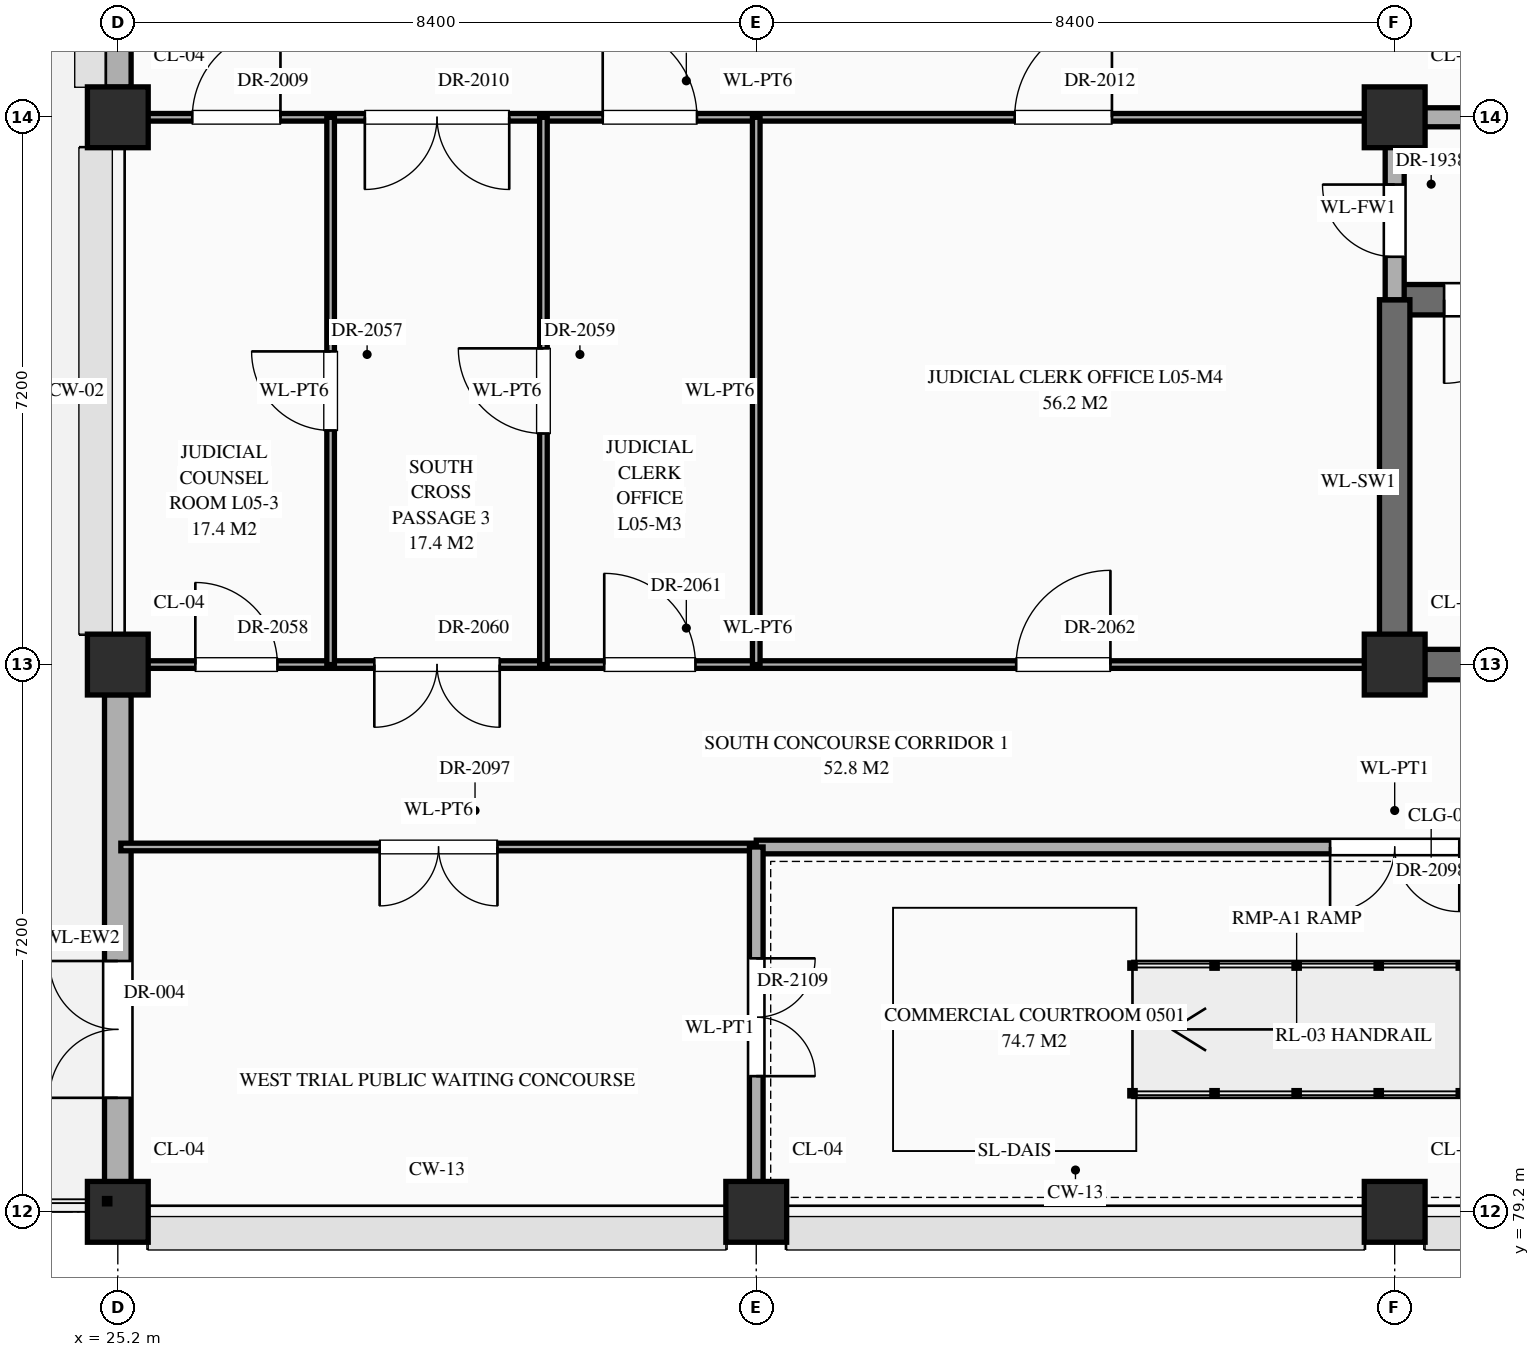
"""IFC4 building model, lengths in metres.
Left out: names, types, materials, properties, quantities, classifications, styles, units other than length and angle.
Written with IfcOpenShell. Run it as: python <this file> out.ifc"""

import sys

from ifc_helpers import new_model, si_unit, direction, frame, frame_2d, origin, origin_2d, place, context, subcontext, project, spatial, rectangle, extrude, element, fill, save


model = new_model("IFC4")
c1 = context("Model", 3, precision=1e-05, world=origin(), true_north=direction((0.0, 1.0)))
c2 = subcontext(c1, "Body", "Model", "MODEL_VIEW")
j1 = project(units=[si_unit("LENGTHUNIT", "METRE"), si_unit("PLANEANGLEUNIT", "RADIAN")], contexts=[c1])
p1 = place(None, origin())
s1 = spatial("IfcSite", under=j1, at=p1, CompositionType="ELEMENT")
p2 = place(p1, origin())
s2 = spatial("IfcBuilding", under=s1, at=p2, CompositionType="ELEMENT")
p3 = place(p2, frame((0.0, 0.0, 21.6)))
s3 = spatial("IfcBuildingStorey", under=s2, at=p3, CompositionType="ELEMENT", Elevation=21.6)
for number, where, z_axis, x_axis in (
    (1, (25.2, 79.2, 0.0), (0.0, 0.0, 1.0), (1.0, 0.0, 0.0)),
    (2, (25.2, 86.4, 0.0), (0.0, 0.0, 1.0), (1.0, 0.0, 0.0)),
    (3, (25.2, 93.6, 0.0), (0.0, 0.0, 1.0), (1.0, 0.0, 0.0)),
    (4, (33.6, 79.2, 0.0), (0.0, 0.0, 1.0), (1.0, 0.0, 0.0)),
    (5, (42.0, 79.2, 0.0), (0.0, 0.0, 1.0), (1.0, 0.0, 0.0)),
    (6, (42.0, 86.4, 0.0), (0.0, 0.0, 1.0), (1.0, 0.0, 0.0)),
    (7, (42.0, 93.6, 0.0), (0.0, 0.0, 1.0), (1.0, 0.0, 0.0)),
):
    element("IfcColumn", number, at=place(p3, frame(where, z_axis=z_axis, x_axis=x_axis)), inside=s3, PredefinedType="COLUMN", context=c2, shape_type="SweptSolid", body=[
        extrude(rectangle(XDim=0.8, YDim=0.8, at=origin_2d()), origin(), (0.0, 0.0, 1.0), 4.5),
    ])
p4 = place(p3, frame((25.2, 79.595, 0.0), z_axis=(0.0, 0.0, 1.0), x_axis=(0.0, 1.0, 0.0)))
e8 = element("IfcWall", 8, at=p4, inside=s3, PredefinedType="STANDARD", context=c2, shape_type="SweptSolid", body=[
    extrude(rectangle(XDim=6.41, YDim=0.35, at=frame_2d((3.205, 0.0))), origin(), (0.0, 0.0, 1.0), 3.59),
])
p5 = place(p4, frame((1.105, 0.0, 0.0)))
e9 = element("IfcOpeningElement", 9, at=p5, cuts=e8, PredefinedType="OPENING", context=c2, shape_type="SweptSolid", body=[
    extrude(rectangle(XDim=1.8, YDim=2.25, at=frame_2d((0.9, 1.125))), frame((0.0, 0.187, 0.0), z_axis=(0.0, -1.0, 0.0), x_axis=(1.0, 0.0, 0.0)), (0.0, 0.0, 1.0), 0.374),
])
p6 = place(p3, frame((25.2, 93.995, 0.0), z_axis=(0.0, 0.0, 1.0), x_axis=(0.0, 1.0, 0.0)))
e10 = element("IfcWall", 10, at=p6, inside=s3, PredefinedType="STANDARD", context=c2, shape_type="SweptSolid", body=[
    extrude(rectangle(XDim=6.41, YDim=0.35, at=frame_2d((3.205, 0.0))), origin(), (0.0, 0.0, 1.0), 3.59),
])
p7 = place(p6, frame((3.905, 0.0, 0.85)))
e11 = element("IfcOpeningElement", 11, at=p7, cuts=e10, PredefinedType="OPENING", context=c2, shape_type="SweptSolid", body=[
    extrude(rectangle(XDim=1.2, YDim=1.74, at=frame_2d((0.6, 0.87))), frame((0.0, 0.187, 0.0), z_axis=(0.0, -1.0, 0.0), x_axis=(1.0, 0.0, 0.0)), (0.0, 0.0, 1.0), 0.374),
])
p8 = place(p3, frame((25.24, 84.0, 0.0), z_axis=(0.0, 0.0, 1.0), x_axis=(1.0, 0.0, 0.0)))
e12 = element("IfcWall", 12, at=p8, inside=s3, PredefinedType="STANDARD", context=c2, shape_type="SweptSolid", body=[
    extrude(rectangle(XDim=8.36, YDim=0.1, at=frame_2d((4.18, 0.0))), origin(), (0.0, 0.0, 1.0), 4.24),
])
p9 = place(p8, frame((3.405, 0.0, 0.0)))
e13 = element("IfcOpeningElement", 13, at=p9, cuts=e12, PredefinedType="OPENING", context=c2, shape_type="SweptSolid", body=[
    extrude(rectangle(XDim=1.55, YDim=2.35, at=frame_2d((0.775, 1.175))), frame((0.0, 0.062, 0.0), z_axis=(0.0, -1.0, 0.0), x_axis=(1.0, 0.0, 0.0)), (0.0, 0.0, 1.0), 0.124),
])
p10 = place(p3, frame((33.6, 84.0, 0.0), z_axis=(0.0, 0.0, 1.0), x_axis=(1.0, 0.0, 0.0)))
e14 = element("IfcWall", 14, at=p10, inside=s3, PredefinedType="STANDARD", context=c2, shape_type="SweptSolid", body=[
    extrude(rectangle(XDim=16.8, YDim=0.18, at=frame_2d((8.4, 0.0))), origin(), (0.0, 0.0, 1.0), 4.24),
])
p11 = place(p10, frame((7.55, 0.0, 0.0)))
e15 = element("IfcOpeningElement", 15, at=p11, cuts=e14, PredefinedType="OPENING", context=c2, shape_type="SweptSolid", body=[
    extrude(rectangle(XDim=1.7, YDim=2.45, at=frame_2d((0.85, 1.225))), frame((0.0, 0.102, 0.0), z_axis=(0.0, -1.0, 0.0), x_axis=(1.0, 0.0, 0.0)), (0.0, 0.0, 1.0), 0.204),
])
p12 = place(p3, frame((25.24, 86.4, 0.0), z_axis=(0.0, 0.0, 1.0), x_axis=(1.0, 0.0, 0.0)))
e16 = element("IfcWall", 16, at=p12, inside=s3, PredefinedType="STANDARD", context=c2, shape_type="SweptSolid", body=[
    extrude(rectangle(XDim=16.76, YDim=0.1, at=frame_2d((8.38, 0.0))), origin(), (0.0, 0.0, 1.0), 3.19),
])
p13 = place(p12, frame((0.98, 0.0, 0.0)))
e17 = element("IfcOpeningElement", 17, at=p13, cuts=e16, PredefinedType="OPENING", context=c2, shape_type="SweptSolid", body=[
    extrude(rectangle(XDim=1.08, YDim=2.25, at=frame_2d((0.54, 1.125))), frame((0.0, 0.062, 0.0), z_axis=(0.0, -1.0, 0.0), x_axis=(1.0, 0.0, 0.0)), (0.0, 0.0, 1.0), 0.124),
])
p14 = place(p12, frame((3.335, 0.0, 0.0)))
e18 = element("IfcOpeningElement", 18, at=p14, cuts=e16, PredefinedType="OPENING", context=c2, shape_type="SweptSolid", body=[
    extrude(rectangle(XDim=1.65, YDim=2.4, at=frame_2d((0.825, 1.2))), frame((0.0, 0.062, 0.0), z_axis=(0.0, -1.0, 0.0), x_axis=(1.0, 0.0, 0.0)), (0.0, 0.0, 1.0), 0.124),
])
p15 = place(p12, frame((6.36, 0.0, 0.0)))
e19 = element("IfcOpeningElement", 19, at=p15, cuts=e16, PredefinedType="OPENING", context=c2, shape_type="SweptSolid", body=[
    extrude(rectangle(XDim=1.2, YDim=2.35, at=frame_2d((0.6, 1.175))), frame((0.0, 0.062, 0.0), z_axis=(0.0, -1.0, 0.0), x_axis=(1.0, 0.0, 0.0)), (0.0, 0.0, 1.0), 0.124),
])
p16 = place(p12, frame((11.78, 0.0, 0.0)))
e20 = element("IfcOpeningElement", 20, at=p16, cuts=e16, PredefinedType="OPENING", context=c2, shape_type="SweptSolid", body=[
    extrude(rectangle(XDim=1.24, YDim=2.3, at=frame_2d((0.62, 1.15))), frame((0.0, 0.062, 0.0), z_axis=(0.0, -1.0, 0.0), x_axis=(1.0, 0.0, 0.0)), (0.0, 0.0, 1.0), 0.124),
])
p17 = place(p3, frame((42.0, 86.4, 0.0), z_axis=(0.0, 0.0, 1.0), x_axis=(1.0, 0.0, 0.0)))
e21 = element("IfcWall", 21, at=p17, inside=s3, PredefinedType="SHEAR", context=c2, shape_type="SweptSolid", body=[
    extrude(rectangle(XDim=8.4, YDim=0.4, at=frame_2d((4.2, 0.0))), origin(), (0.0, 0.0, 1.0), 4.24),
])
p18 = place(p3, frame((42.0, 91.2, 0.0), z_axis=(0.0, 0.0, 1.0), x_axis=(1.0, 0.0, 0.0)))
e22 = element("IfcWall", 22, at=p18, inside=s3, PredefinedType="SHEAR", context=c2, shape_type="SweptSolid", body=[
    extrude(rectangle(XDim=8.4, YDim=0.4, at=frame_2d((4.2, 0.0))), origin(), (0.0, 0.0, 1.0), 4.24),
])
p19 = place(p18, frame((0.65, 0.0, 0.0)))
e23 = element("IfcOpeningElement", 23, at=p19, cuts=e22, PredefinedType="OPENING", context=c2, shape_type="SweptSolid", body=[
    extrude(rectangle(XDim=1.1, YDim=2.2, at=frame_2d((0.55, 1.1))), frame((0.0, 0.212, 0.0), z_axis=(0.0, -1.0, 0.0), x_axis=(1.0, 0.0, 0.0)), (0.0, 0.0, 1.0), 0.424),
])
p20 = place(p3, frame((25.24, 93.6, 0.0), z_axis=(0.0, 0.0, 1.0), x_axis=(1.0, 0.0, 0.0)))
e24 = element("IfcWall", 24, at=p20, inside=s3, PredefinedType="STANDARD", context=c2, shape_type="SweptSolid", body=[
    extrude(rectangle(XDim=16.76, YDim=0.1, at=frame_2d((8.38, 0.0))), origin(), (0.0, 0.0, 1.0), 3.19),
])
p21 = place(p20, frame((0.94, 0.0, 0.0)))
e25 = element("IfcOpeningElement", 25, at=p21, cuts=e24, PredefinedType="OPENING", context=c2, shape_type="SweptSolid", body=[
    extrude(rectangle(XDim=1.16, YDim=2.3, at=frame_2d((0.58, 1.15))), frame((0.0, 0.062, 0.0), z_axis=(0.0, -1.0, 0.0), x_axis=(1.0, 0.0, 0.0)), (0.0, 0.0, 1.0), 0.124),
])
p22 = place(p20, frame((3.21, 0.0, 0.0)))
e26 = element("IfcOpeningElement", 26, at=p22, cuts=e24, PredefinedType="OPENING", context=c2, shape_type="SweptSolid", body=[
    extrude(rectangle(XDim=1.9, YDim=2.5, at=frame_2d((0.95, 1.25))), frame((0.0, 0.062, 0.0), z_axis=(0.0, -1.0, 0.0), x_axis=(1.0, 0.0, 0.0)), (0.0, 0.0, 1.0), 0.124),
])
p23 = place(p20, frame((6.34, 0.0, 0.0)))
e27 = element("IfcOpeningElement", 27, at=p23, cuts=e24, PredefinedType="OPENING", context=c2, shape_type="SweptSolid", body=[
    extrude(rectangle(XDim=1.24, YDim=2.3, at=frame_2d((0.62, 1.15))), frame((0.0, 0.062, 0.0), z_axis=(0.0, -1.0, 0.0), x_axis=(1.0, 0.0, 0.0)), (0.0, 0.0, 1.0), 0.124),
])
p24 = place(p20, frame((11.76, 0.0, 0.0)))
e28 = element("IfcOpeningElement", 28, at=p24, cuts=e24, PredefinedType="OPENING", context=c2, shape_type="SweptSolid", body=[
    extrude(rectangle(XDim=1.28, YDim=2.35, at=frame_2d((0.64, 1.175))), frame((0.0, 0.062, 0.0), z_axis=(0.0, -1.0, 0.0), x_axis=(1.0, 0.0, 0.0)), (0.0, 0.0, 1.0), 0.124),
])
p25 = place(p3, frame((42.0, 93.6, 0.0), z_axis=(0.0, 0.0, 1.0), x_axis=(1.0, 0.0, 0.0)))
e29 = element("IfcWall", 29, at=p25, inside=s3, PredefinedType="STANDARD", context=c2, shape_type="SweptSolid", body=[
    extrude(rectangle(XDim=8.4, YDim=0.25, at=frame_2d((4.2, 0.0))), origin(), (0.0, 0.0, 1.0), 3.39),
])
p26 = place(p25, frame((3.45, 0.0, 0.0)))
e30 = element("IfcOpeningElement", 30, at=p26, cuts=e29, PredefinedType="OPENING", context=c2, shape_type="SweptSolid", body=[
    extrude(rectangle(XDim=1.5, YDim=2.25, at=frame_2d((0.75, 1.125))), frame((0.0, 0.137, 0.0), z_axis=(0.0, -1.0, 0.0), x_axis=(1.0, 0.0, 0.0)), (0.0, 0.0, 1.0), 0.274),
])
p27 = place(p3, frame((28.0, 86.4, 0.0), z_axis=(0.0, 0.0, 1.0), x_axis=(0.0, 1.0, 0.0)))
e31 = element("IfcWall", 31, at=p27, inside=s3, PredefinedType="STANDARD", context=c2, shape_type="SweptSolid", body=[
    extrude(rectangle(XDim=7.2, YDim=0.1, at=frame_2d((3.6, 0.0))), origin(), (0.0, 0.0, 1.0), 4.24),
])
p28 = place(p27, frame((3.08, 0.0, 0.0)))
e32 = element("IfcOpeningElement", 32, at=p28, cuts=e31, PredefinedType="OPENING", context=c2, shape_type="SweptSolid", body=[
    extrude(rectangle(XDim=1.04, YDim=2.2, at=frame_2d((0.52, 1.1))), frame((0.0, 0.062, 0.0), z_axis=(0.0, -1.0, 0.0), x_axis=(1.0, 0.0, 0.0)), (0.0, 0.0, 1.0), 0.124),
])
p29 = place(p3, frame((30.8, 86.4, 0.0), z_axis=(0.0, 0.0, 1.0), x_axis=(0.0, 1.0, 0.0)))
e33 = element("IfcWall", 33, at=p29, inside=s3, PredefinedType="STANDARD", context=c2, shape_type="SweptSolid", body=[
    extrude(rectangle(XDim=7.2, YDim=0.1, at=frame_2d((3.6, 0.0))), origin(), (0.0, 0.0, 1.0), 4.24),
])
p30 = place(p29, frame((3.04, 0.0, 0.0)))
e34 = element("IfcOpeningElement", 34, at=p30, cuts=e33, PredefinedType="OPENING", context=c2, shape_type="SweptSolid", body=[
    extrude(rectangle(XDim=1.12, YDim=2.25, at=frame_2d((0.56, 1.125))), frame((0.0, 0.062, 0.0), z_axis=(0.0, -1.0, 0.0), x_axis=(1.0, 0.0, 0.0)), (0.0, 0.0, 1.0), 0.124),
])
p31 = place(p3, frame((33.6, 79.24, 0.0), z_axis=(0.0, 0.0, 1.0), x_axis=(0.0, 1.0, 0.0)))
e35 = element("IfcWall", 35, at=p31, inside=s3, PredefinedType="STANDARD", context=c2, shape_type="SweptSolid", body=[
    extrude(rectangle(XDim=4.76, YDim=0.18, at=frame_2d((2.38, 0.0))), origin(), (0.0, 0.0, 1.0), 4.24),
])
p32 = place(p31, frame((1.745, 0.0, 0.0)))
e36 = element("IfcOpeningElement", 36, at=p32, cuts=e35, PredefinedType="OPENING", context=c2, shape_type="SweptSolid", body=[
    extrude(rectangle(XDim=1.55, YDim=2.35, at=frame_2d((0.775, 1.175))), frame((0.0, 0.102, 0.0), z_axis=(0.0, -1.0, 0.0), x_axis=(1.0, 0.0, 0.0)), (0.0, 0.0, 1.0), 0.204),
])
p33 = place(p3, frame((33.6, 86.4, 0.0), z_axis=(0.0, 0.0, 1.0), x_axis=(0.0, 1.0, 0.0)))
e37 = element("IfcWall", 37, at=p33, inside=s3, PredefinedType="STANDARD", context=c2, shape_type="SweptSolid", body=[
    extrude(rectangle(XDim=7.2, YDim=0.1, at=frame_2d((3.6, 0.0))), origin(), (0.0, 0.0, 1.0), 4.24),
])
p34 = place(p3, frame((42.0, 86.4, 0.0), z_axis=(0.0, 0.0, 1.0), x_axis=(0.0, 1.0, 0.0)))
e38 = element("IfcWall", 38, at=p34, inside=s3, PredefinedType="SHEAR", context=c2, shape_type="SweptSolid", body=[
    extrude(rectangle(XDim=4.8, YDim=0.4, at=frame_2d((2.4, 0.0))), origin(), (0.0, 0.0, 1.0), 4.24),
])
p35 = place(p3, frame((42.0, 91.2, 0.0), z_axis=(0.0, 0.0, 1.0), x_axis=(0.0, 1.0, 0.0)))
e39 = element("IfcWall", 39, at=p35, inside=s3, PredefinedType="STANDARD", context=c2, shape_type="SweptSolid", body=[
    extrude(rectangle(XDim=2.4, YDim=0.25, at=frame_2d((1.2, 0.0))), origin(), (0.0, 0.0, 1.0), 3.49),
])
p36 = place(p35, frame((0.565, 0.0, 0.0)))
e40 = element("IfcOpeningElement", 40, at=p36, cuts=e39, PredefinedType="OPENING", context=c2, shape_type="SweptSolid", body=[
    extrude(rectangle(XDim=0.95, YDim=2.15, at=frame_2d((0.475, 1.075))), frame((0.0, 0.137, 0.0), z_axis=(0.0, -1.0, 0.0), x_axis=(1.0, 0.0, 0.0)), (0.0, 0.0, 1.0), 0.274),
])
p37 = place(p5, origin())
e41 = element("IfcDoor", 41, at=p37, inside=s3, OperationType="DOUBLE_DOOR_SINGLE_SWING", PredefinedType="DOOR", context=c2, shape_type="SweptSolid", body=[
    extrude(rectangle(XDim=1.8, YDim=2.25, at=frame_2d((0.9, 1.125))), frame((0.0, 0.025, 0.0), z_axis=(0.0, -1.0, 0.0), x_axis=(1.0, 0.0, 0.0)), (0.0, 0.0, 1.0), 0.05),
])
fill(e9, e41)
p38 = place(p19, frame((1.1, 0.0, 0.0), z_axis=(0.0, 0.0, 1.0), x_axis=(-1.0, 0.0, 0.0)))
e42 = element("IfcDoor", 42, at=p38, inside=s3, OperationType="SINGLE_SWING_RIGHT", PredefinedType="DOOR", context=c2, shape_type="SweptSolid", body=[
    extrude(rectangle(XDim=1.1, YDim=2.2, at=frame_2d((0.55, 1.1))), frame((0.0, 0.025, 0.0), z_axis=(0.0, -1.0, 0.0), x_axis=(1.0, 0.0, 0.0)), (0.0, 0.0, 1.0), 0.05),
])
fill(e23, e42)
p39 = place(p36, origin())
e43 = element("IfcDoor", 43, at=p39, inside=s3, OperationType="SINGLE_SWING_RIGHT", PredefinedType="DOOR", context=c2, shape_type="SweptSolid", body=[
    extrude(rectangle(XDim=0.95, YDim=2.15, at=frame_2d((0.475, 1.075))), frame((0.0, 0.025, 0.0), z_axis=(0.0, -1.0, 0.0), x_axis=(1.0, 0.0, 0.0)), (0.0, 0.0, 1.0), 0.05),
])
fill(e40, e43)
p40 = place(p21, origin())
e44 = element("IfcDoor", 44, at=p40, inside=s3, OperationType="SINGLE_SWING_RIGHT", PredefinedType="DOOR", context=c2, shape_type="SweptSolid", body=[
    extrude(rectangle(XDim=1.16, YDim=2.3, at=frame_2d((0.58, 1.15))), frame((0.0, 0.025, 0.0), z_axis=(0.0, -1.0, 0.0), x_axis=(1.0, 0.0, 0.0)), (0.0, 0.0, 1.0), 0.05),
])
fill(e25, e44)
p41 = place(p22, frame((1.9, 0.0, 0.0), z_axis=(0.0, 0.0, 1.0), x_axis=(-1.0, 0.0, 0.0)))
e45 = element("IfcDoor", 45, at=p41, inside=s3, OperationType="DOUBLE_DOOR_SINGLE_SWING", PredefinedType="DOOR", context=c2, shape_type="SweptSolid", body=[
    extrude(rectangle(XDim=1.9, YDim=2.5, at=frame_2d((0.95, 1.25))), frame((0.0, 0.025, 0.0), z_axis=(0.0, -1.0, 0.0), x_axis=(1.0, 0.0, 0.0)), (0.0, 0.0, 1.0), 0.05),
])
fill(e26, e45)
p42 = place(p23, origin())
e46 = element("IfcDoor", 46, at=p42, inside=s3, OperationType="SINGLE_SWING_LEFT", PredefinedType="DOOR", context=c2, shape_type="SweptSolid", body=[
    extrude(rectangle(XDim=1.24, YDim=2.3, at=frame_2d((0.62, 1.15))), frame((0.0, 0.025, 0.0), z_axis=(0.0, -1.0, 0.0), x_axis=(1.0, 0.0, 0.0)), (0.0, 0.0, 1.0), 0.05),
])
fill(e27, e46)
p43 = place(p24, origin())
e47 = element("IfcDoor", 47, at=p43, inside=s3, OperationType="SINGLE_SWING_RIGHT", PredefinedType="DOOR", context=c2, shape_type="SweptSolid", body=[
    extrude(rectangle(XDim=1.28, YDim=2.35, at=frame_2d((0.64, 1.175))), frame((0.0, 0.025, 0.0), z_axis=(0.0, -1.0, 0.0), x_axis=(1.0, 0.0, 0.0)), (0.0, 0.0, 1.0), 0.05),
])
fill(e28, e47)
p44 = place(p28, origin())
e48 = element("IfcDoor", 48, at=p44, inside=s3, OperationType="SINGLE_SWING_RIGHT", PredefinedType="DOOR", context=c2, shape_type="SweptSolid", body=[
    extrude(rectangle(XDim=1.04, YDim=2.2, at=frame_2d((0.52, 1.1))), frame((0.0, 0.025, 0.0), z_axis=(0.0, -1.0, 0.0), x_axis=(1.0, 0.0, 0.0)), (0.0, 0.0, 1.0), 0.05),
])
fill(e32, e48)
p45 = place(p13, origin())
e49 = element("IfcDoor", 49, at=p45, inside=s3, OperationType="SINGLE_SWING_LEFT", PredefinedType="DOOR", context=c2, shape_type="SweptSolid", body=[
    extrude(rectangle(XDim=1.08, YDim=2.25, at=frame_2d((0.54, 1.125))), frame((0.0, 0.025, 0.0), z_axis=(0.0, -1.0, 0.0), x_axis=(1.0, 0.0, 0.0)), (0.0, 0.0, 1.0), 0.05),
])
fill(e17, e49)
p46 = place(p30, origin())
e50 = element("IfcDoor", 50, at=p46, inside=s3, OperationType="SINGLE_SWING_RIGHT", PredefinedType="DOOR", context=c2, shape_type="SweptSolid", body=[
    extrude(rectangle(XDim=1.12, YDim=2.25, at=frame_2d((0.56, 1.125))), frame((0.0, 0.025, 0.0), z_axis=(0.0, -1.0, 0.0), x_axis=(1.0, 0.0, 0.0)), (0.0, 0.0, 1.0), 0.05),
])
fill(e34, e50)
p47 = place(p14, frame((1.65, 0.0, 0.0), z_axis=(0.0, 0.0, 1.0), x_axis=(-1.0, 0.0, 0.0)))
e51 = element("IfcDoor", 51, at=p47, inside=s3, OperationType="DOUBLE_DOOR_SINGLE_SWING", PredefinedType="DOOR", context=c2, shape_type="SweptSolid", body=[
    extrude(rectangle(XDim=1.65, YDim=2.4, at=frame_2d((0.825, 1.2))), frame((0.0, 0.025, 0.0), z_axis=(0.0, -1.0, 0.0), x_axis=(1.0, 0.0, 0.0)), (0.0, 0.0, 1.0), 0.05),
])
fill(e18, e51)
p48 = place(p15, origin())
e52 = element("IfcDoor", 52, at=p48, inside=s3, OperationType="SINGLE_SWING_LEFT", PredefinedType="DOOR", context=c2, shape_type="SweptSolid", body=[
    extrude(rectangle(XDim=1.2, YDim=2.35, at=frame_2d((0.6, 1.175))), frame((0.0, 0.025, 0.0), z_axis=(0.0, -1.0, 0.0), x_axis=(1.0, 0.0, 0.0)), (0.0, 0.0, 1.0), 0.05),
])
fill(e19, e52)
p49 = place(p16, origin())
e53 = element("IfcDoor", 53, at=p49, inside=s3, OperationType="SINGLE_SWING_RIGHT", PredefinedType="DOOR", context=c2, shape_type="SweptSolid", body=[
    extrude(rectangle(XDim=1.24, YDim=2.3, at=frame_2d((0.62, 1.15))), frame((0.0, 0.025, 0.0), z_axis=(0.0, -1.0, 0.0), x_axis=(1.0, 0.0, 0.0)), (0.0, 0.0, 1.0), 0.05),
])
fill(e20, e53)
p50 = place(p9, frame((1.55, 0.0, 0.0), z_axis=(0.0, 0.0, 1.0), x_axis=(-1.0, 0.0, 0.0)))
e54 = element("IfcDoor", 54, at=p50, inside=s3, OperationType="DOUBLE_DOOR_SINGLE_SWING", PredefinedType="DOOR", context=c2, shape_type="SweptSolid", body=[
    extrude(rectangle(XDim=1.55, YDim=2.35, at=frame_2d((0.775, 1.175))), frame((0.0, 0.025, 0.0), z_axis=(0.0, -1.0, 0.0), x_axis=(1.0, 0.0, 0.0)), (0.0, 0.0, 1.0), 0.05),
])
fill(e13, e54)
p51 = place(p11, frame((1.7, 0.0, 0.0), z_axis=(0.0, 0.0, 1.0), x_axis=(-1.0, 0.0, 0.0)))
e55 = element("IfcDoor", 55, at=p51, inside=s3, OperationType="DOUBLE_DOOR_SINGLE_SWING", PredefinedType="DOOR", context=c2, shape_type="SweptSolid", body=[
    extrude(rectangle(XDim=1.7, YDim=2.45, at=frame_2d((0.85, 1.225))), frame((0.0, 0.025, 0.0), z_axis=(0.0, -1.0, 0.0), x_axis=(1.0, 0.0, 0.0)), (0.0, 0.0, 1.0), 0.05),
])
fill(e15, e55)
p52 = place(p32, frame((1.55, 0.0, 0.0), z_axis=(0.0, 0.0, 1.0), x_axis=(-1.0, 0.0, 0.0)))
e56 = element("IfcDoor", 56, at=p52, inside=s3, OperationType="DOUBLE_DOOR_SINGLE_SWING", PredefinedType="DOOR", context=c2, shape_type="SweptSolid", body=[
    extrude(rectangle(XDim=1.55, YDim=2.35, at=frame_2d((0.775, 1.175))), frame((0.0, 0.025, 0.0), z_axis=(0.0, -1.0, 0.0), x_axis=(1.0, 0.0, 0.0)), (0.0, 0.0, 1.0), 0.05),
])
fill(e36, e56)
save(model, sys.argv[1])
